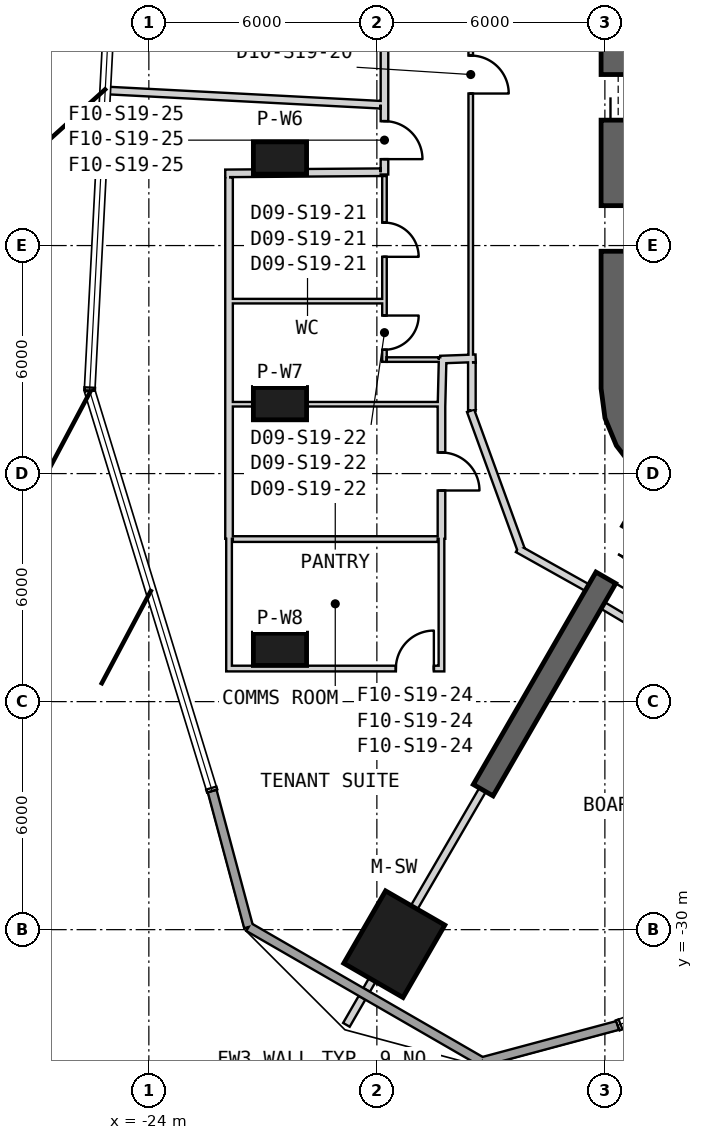
"""IFC4 building model, lengths in metres.
Left out: names, types, materials, properties, quantities, classifications, styles, units other than length and angle.
Written with IfcOpenShell. Run it as: python <this file> out.ifc"""

import sys

from ifc_helpers import new_model, si_unit, direction, frame, frame_2d, origin, origin_2d, place, context, subcontext, project, spatial, polyline, rectangle, outline, extrude, element, fill, save


model = new_model("IFC4")
c1 = context("Model", 3, precision=1e-05, world=origin(), true_north=direction((0.0, 1.0)))
c2 = subcontext(c1, "Body", "Model", "MODEL_VIEW")
j1 = project(units=[si_unit("LENGTHUNIT", "METRE"), si_unit("PLANEANGLEUNIT", "RADIAN")], contexts=[c1])
p1 = place(None, origin())
s1 = spatial("IfcSite", under=j1, at=p1, CompositionType="ELEMENT")
p2 = place(p1, origin())
s2 = spatial("IfcBuilding", under=s1, at=p2, CompositionType="ELEMENT")
p3 = place(p2, frame((0.0, 0.0, 310.4)))
s3 = spatial("IfcBuildingStorey", under=s2, at=p3, CompositionType="ELEMENT", Elevation=310.4)
p4 = place(p3, frame((-17.542, -30.383, 0.0), z_axis=(0.0, 0.0, 1.0), x_axis=(-0.5, -0.866025403784, 0.0)))
e1 = element("IfcColumn", 1, at=p4, inside=s3, PredefinedType="COLUMN", context=c2, shape_type="SweptSolid", body=[
    extrude(rectangle(XDim=2.2, YDim=1.8, at=origin_2d()), origin(), (0.0, 0.0, 1.0), 3.9),
])
for number, where, z_axis, x_axis in (
    (2, (-20.55, -9.696, 0.0), (0.0, 0.0, 1.0), (-1.0, 0.0, 0.0)),
    (3, (-20.55, -16.16, 0.0), (0.0, 0.0, 1.0), (-1.0, 0.0, 0.0)),
    (4, (-20.55, -22.624, 0.0), (0.0, 0.0, 1.0), (-1.0, 0.0, 0.0)),
):
    element("IfcColumn", number, at=place(p3, frame(where, z_axis=z_axis, x_axis=x_axis)), inside=s3, PredefinedType="COLUMN", context=c2, shape_type="SweptSolid", body=[
        extrude(rectangle(XDim=1.4, YDim=0.85, at=origin_2d()), origin(), (0.0, 0.0, 1.0), 3.9),
    ])
p5 = place(p3, frame((-11.65, 15.762, 0.0), z_axis=(0.0, 0.0, 1.0), x_axis=(0.0, -1.0, 0.0)))
e5 = element("IfcWall", 5, at=p5, inside=s3, PredefinedType="SHEAR", context=c2, shape_type="SweptSolid", body=[
    extrude(rectangle(XDim=31.523, YDim=0.9, at=frame_2d((15.762, 0.0))), origin(), (0.0, 0.0, 1.0), 3.9),
])
p6 = place(p5, frame((7.062, 0.0, 0.0)))
e6 = element("IfcOpeningElement", 6, at=p6, cuts=e5, PredefinedType="OPENING", context=c2, shape_type="SweptSolid", body=[
    extrude(rectangle(XDim=1.2, YDim=2.4, at=frame_2d((0.6, 1.2))), frame((0.0, 0.46, 0.0), z_axis=(0.0, -1.0, 0.0), x_axis=(1.0, 0.0, 0.0)), (0.0, 0.0, 1.0), 0.92),
])
p7 = place(p5, frame((9.762, 0.0, 0.0)))
e7 = element("IfcOpeningElement", 7, at=p7, cuts=e5, PredefinedType="OPENING", context=c2, shape_type="SweptSolid", body=[
    extrude(rectangle(XDim=1.2, YDim=2.4, at=frame_2d((0.6, 1.2))), frame((0.0, 0.46, 0.0), z_axis=(0.0, -1.0, 0.0), x_axis=(1.0, 0.0, 0.0)), (0.0, 0.0, 1.0), 0.92),
])
p8 = place(p5, frame((12.462, 0.0, 0.0)))
e8 = element("IfcOpeningElement", 8, at=p8, cuts=e5, PredefinedType="OPENING", context=c2, shape_type="SweptSolid", body=[
    extrude(rectangle(XDim=1.2, YDim=2.4, at=frame_2d((0.6, 1.2))), frame((0.0, 0.46, 0.0), z_axis=(0.0, -1.0, 0.0), x_axis=(1.0, 0.0, 0.0)), (0.0, 0.0, 1.0), 0.92),
])
p9 = place(p5, frame((15.162, 0.0, 0.0)))
e9 = element("IfcOpeningElement", 9, at=p9, cuts=e5, PredefinedType="OPENING", context=c2, shape_type="SweptSolid", body=[
    extrude(rectangle(XDim=1.2, YDim=2.4, at=frame_2d((0.6, 1.2))), frame((0.0, 0.46, 0.0), z_axis=(0.0, -1.0, 0.0), x_axis=(1.0, 0.0, 0.0)), (0.0, 0.0, 1.0), 0.92),
])
p10 = place(p5, frame((17.862, 0.0, 0.0)))
e10 = element("IfcOpeningElement", 10, at=p10, cuts=e5, PredefinedType="OPENING", context=c2, shape_type="SweptSolid", body=[
    extrude(rectangle(XDim=1.2, YDim=2.4, at=frame_2d((0.6, 1.2))), frame((0.0, 0.46, 0.0), z_axis=(0.0, -1.0, 0.0), x_axis=(1.0, 0.0, 0.0)), (0.0, 0.0, 1.0), 0.92),
])
p11 = place(p5, frame((20.562, 0.0, 0.0)))
e11 = element("IfcOpeningElement", 11, at=p11, cuts=e5, PredefinedType="OPENING", context=c2, shape_type="SweptSolid", body=[
    extrude(rectangle(XDim=1.2, YDim=2.4, at=frame_2d((0.6, 1.2))), frame((0.0, 0.46, 0.0), z_axis=(0.0, -1.0, 0.0), x_axis=(1.0, 0.0, 0.0)), (0.0, 0.0, 1.0), 0.92),
])
p12 = place(p5, frame((23.262, 0.0, 0.0)))
e12 = element("IfcOpeningElement", 12, at=p12, cuts=e5, PredefinedType="OPENING", context=c2, shape_type="SweptSolid", body=[
    extrude(rectangle(XDim=1.2, YDim=2.4, at=frame_2d((0.6, 1.2))), frame((0.0, 0.46, 0.0), z_axis=(0.0, -1.0, 0.0), x_axis=(1.0, 0.0, 0.0)), (0.0, 0.0, 1.0), 0.92),
])
p13 = place(p5, frame((3.612, 0.0, 0.0)))
e13 = element("IfcOpeningElement", 13, at=p13, cuts=e5, PredefinedType="OPENING", context=c2, shape_type="SweptSolid", body=[
    extrude(rectangle(XDim=1.2, YDim=2.4, at=frame_2d((0.6, 1.2))), frame((0.0, 0.46, 0.0), z_axis=(0.0, -1.0, 0.0), x_axis=(1.0, 0.0, 0.0)), (0.0, 0.0, 1.0), 0.92),
])
p14 = place(p5, frame((26.712, 0.0, 0.0)))
e14 = element("IfcOpeningElement", 14, at=p14, cuts=e5, PredefinedType="OPENING", context=c2, shape_type="SweptSolid", body=[
    extrude(rectangle(XDim=1.2, YDim=2.4, at=frame_2d((0.6, 1.2))), frame((0.0, 0.46, 0.0), z_axis=(0.0, -1.0, 0.0), x_axis=(1.0, 0.0, 0.0)), (0.0, 0.0, 1.0), 0.92),
])
p15 = place(p3, origin())
e15 = element("IfcWall", 15, at=p15, inside=s3, PredefinedType="SHEAR", context=c2, shape_type="SweptSolid", body=[
    extrude(outline(polyline([(-12.1, -15.762), (-11.998, -16.538), (-11.698, -17.262), (-11.221, -17.883), (-10.6, -18.36), (-9.876, -18.659), (-9.1, -18.762), (-8.323, -18.659), (-7.6, -18.36), (-8.05, -17.58), (-8.556, -17.79), (-9.1, -17.862), (-9.644, -17.79), (-10.15, -17.58), (-10.585, -17.247), (-10.919, -16.812), (-11.128, -16.305), (-11.2, -15.762), (-12.1, -15.762)])), origin(), (0.0, 0.0, 1.0), 3.9),
])
p16 = place(p3, frame((-10.575, -18.316, 0.0), z_axis=(0.0, 0.0, 1.0), x_axis=(-0.500009446655, -0.866019949687, 0.0)))
e16 = element("IfcWall", 16, at=p16, inside=s3, PredefinedType="SHEAR", context=c2, shape_type="SweptSolid", body=[
    extrude(rectangle(XDim=9.254, YDim=0.6, at=frame_2d((4.627, 0.0))), origin(), (0.0, 0.0, 1.0), 3.9),
])
p17 = place(p16, frame((1.4, 0.0, 0.0)))
e17 = element("IfcOpeningElement", 17, at=p17, cuts=e16, PredefinedType="OPENING", context=c2, shape_type="SweptSolid", body=[
    extrude(rectangle(XDim=1.4, YDim=2.4, at=frame_2d((0.7, 1.2))), frame((0.0, 0.31, 0.0), z_axis=(0.0, -1.0, 0.0), x_axis=(1.0, 0.0, 0.0)), (0.0, 0.0, 1.0), 0.62),
])
p18 = place(p3, frame((-22.334, -26.352, 0.0), z_axis=(0.0, 0.0, 1.0), x_axis=(0.258810736071, -0.965928052649, 0.0)))
e18 = element("IfcWall", 18, at=p18, inside=s3, PredefinedType="SOLIDWALL", context=c2, shape_type="SweptSolid", body=[
    extrude(rectangle(XDim=3.705, YDim=0.24, at=frame_2d((1.853, 0.0))), origin(), (0.0, 0.0, 1.0), 3.6),
])
p19 = place(p3, frame((-21.375, -29.931, 0.0), z_axis=(0.0, 0.0, 1.0), x_axis=(0.866031377081, -0.499989653803, 0.0)))
e19 = element("IfcWall", 19, at=p19, inside=s3, PredefinedType="SOLIDWALL", context=c2, shape_type="SweptSolid", body=[
    extrude(rectangle(XDim=7.092, YDim=0.24, at=frame_2d((3.546, 0.0))), origin(), (0.0, 0.0, 1.0), 3.6),
])
p20 = place(p3, frame((-15.233, -33.477, 0.0), z_axis=(0.0, 0.0, 1.0), x_axis=(0.965938323568, 0.258772400119, 0.0)))
e20 = element("IfcWall", 20, at=p20, inside=s3, PredefinedType="SOLIDWALL", context=c2, shape_type="SweptSolid", body=[
    extrude(rectangle(XDim=3.697, YDim=0.24, at=frame_2d((1.848, 0.0))), origin(), (0.0, 0.0, 1.0), 3.6),
])
p21 = place(p3, frame((-15.53, 0.0, 0.0), z_axis=(0.0, 0.0, 1.0), x_axis=(0.0, -1.0, 0.0)))
e21 = element("IfcWall", 21, at=p21, inside=s3, PredefinedType="PARTITIONING", context=c2, shape_type="SweptSolid", body=[
    extrude(rectangle(XDim=15.0, YDim=0.12, at=frame_2d((7.5, 0.0))), origin(), (0.0, 0.0, 1.0), 2.88),
])
p22 = place(p21, frame((7.0, 0.0, 0.0)))
e22 = element("IfcOpeningElement", 22, at=p22, cuts=e21, PredefinedType="OPENING", context=c2, shape_type="SweptSolid", body=[
    extrude(rectangle(XDim=1.0, YDim=2.1, at=frame_2d((0.5, 1.05))), frame((0.0, 0.07, 0.0), z_axis=(0.0, -1.0, 0.0), x_axis=(1.0, 0.0, 0.0)), (0.0, 0.0, 1.0), 0.14),
])
p23 = place(p3, frame((-17.8, 0.1, 0.0), z_axis=(0.0, 0.0, 1.0), x_axis=(0.0, -1.0, 0.0)))
e23 = element("IfcWall", 23, at=p23, inside=s3, PredefinedType="PARTITIONING", context=c2, shape_type="SweptSolid", body=[
    extrude(rectangle(XDim=8.423, YDim=0.2, at=frame_2d((4.211, 0.0))), origin(), (0.0, 0.0, 1.0), 2.97),
])
p24 = place(p23, frame((3.75, 0.0, 0.0)))
e24 = element("IfcOpeningElement", 24, at=p24, cuts=e23, PredefinedType="OPENING", context=c2, shape_type="SweptSolid", body=[
    extrude(rectangle(XDim=1.0, YDim=2.1, at=frame_2d((0.5, 1.05))), frame((0.0, 0.11, 0.0), z_axis=(0.0, -1.0, 0.0), x_axis=(1.0, 0.0, 0.0)), (0.0, 0.0, 1.0), 0.22),
])
p25 = place(p3, frame((-17.8, -8.323, 0.0), z_axis=(0.0, 0.0, 1.0), x_axis=(0.0, -1.0, 0.0)))
e25 = element("IfcWall", 25, at=p25, inside=s3, PredefinedType="PARTITIONING", context=c2, shape_type="SweptSolid", body=[
    extrude(rectangle(XDim=1.807, YDim=0.2, at=frame_2d((0.904, 0.0))), origin(), (0.0, 0.0, 1.0), 2.97),
])
p26 = place(p25, frame((0.404, 0.0, 0.0)))
e26 = element("IfcOpeningElement", 26, at=p26, cuts=e25, PredefinedType="OPENING", context=c2, shape_type="SweptSolid", body=[
    extrude(rectangle(XDim=1.0, YDim=2.1, at=frame_2d((0.5, 1.05))), frame((0.0, 0.11, 0.0), z_axis=(0.0, -1.0, 0.0), x_axis=(1.0, 0.0, 0.0)), (0.0, 0.0, 1.0), 0.22),
])
p27 = place(p3, frame((-16.33, -15.0, 0.0), z_axis=(0.0, 0.0, 1.0), x_axis=(0.999344339616, 0.036206227059, 0.0)))
e27 = element("IfcWall", 27, at=p27, inside=s3, PredefinedType="PARTITIONING", context=c2, shape_type="SweptSolid", body=[
    extrude(rectangle(XDim=0.93, YDim=0.2, at=frame_2d((0.465, 0.0))), origin(), (0.0, 0.0, 1.0), 3.6),
])
p28 = place(p3, frame((-17.8, -10.17, 0.0), z_axis=(0.0, 0.0, 1.0), x_axis=(0.0, -1.0, 0.0)))
e28 = element("IfcWall", 28, at=p28, inside=s3, PredefinedType="PARTITIONING", context=c2, shape_type="SweptSolid", body=[
    extrude(rectangle(XDim=4.89, YDim=0.12, at=frame_2d((2.445, 0.0))), origin(), (0.0, 0.0, 1.0), 2.88),
])
p29 = place(p28, frame((1.226, 0.0, 0.0)))
e29 = element("IfcOpeningElement", 29, at=p29, cuts=e28, PredefinedType="OPENING", context=c2, shape_type="SweptSolid", body=[
    extrude(rectangle(XDim=0.9, YDim=2.1, at=frame_2d((0.45, 1.05))), frame((0.0, 0.07, 0.0), z_axis=(0.0, -1.0, 0.0), x_axis=(1.0, 0.0, 0.0)), (0.0, 0.0, 1.0), 0.14),
])
p30 = place(p28, frame((3.671, 0.0, 0.0)))
e30 = element("IfcOpeningElement", 30, at=p30, cuts=e28, PredefinedType="OPENING", context=c2, shape_type="SweptSolid", body=[
    extrude(rectangle(XDim=0.9, YDim=2.1, at=frame_2d((0.45, 1.05))), frame((0.0, 0.07, 0.0), z_axis=(0.0, -1.0, 0.0), x_axis=(1.0, 0.0, 0.0)), (0.0, 0.0, 1.0), 0.14),
])
p31 = place(p3, frame((-17.74, -15.0, 0.0), z_axis=(0.0, 0.0, 1.0), x_axis=(1.0, 0.0, 0.0)))
e31 = element("IfcWall", 31, at=p31, inside=s3, PredefinedType="PARTITIONING", context=c2, shape_type="SweptSolid", body=[
    extrude(rectangle(XDim=1.37, YDim=0.12, at=frame_2d((0.685, 0.0))), origin(), (0.0, 0.0, 1.0), 3.6),
])
p32 = place(p3, frame((-14.293, -19.978, 0.0), z_axis=(0.0, 0.0, 1.0), x_axis=(0.872510000486, -0.48859625362, 0.0)))
e32 = element("IfcWall", 32, at=p32, inside=s3, PredefinedType="PARTITIONING", context=c2, shape_type="SweptSolid", body=[
    extrude(rectangle(XDim=2.09, YDim=0.2, at=frame_2d((1.045, 0.0))), origin(), (0.0, 0.0, 1.0), 3.6),
])
p33 = place(p3, frame((-15.534, -16.346, 0.0), z_axis=(0.0, 0.0, 1.0), x_axis=(0.342001008711, -0.939699584996, 0.0)))
e33 = element("IfcWall", 33, at=p33, inside=s3, PredefinedType="PARTITIONING", context=c2, shape_type="SweptSolid", body=[
    extrude(rectangle(XDim=3.875, YDim=0.2, at=frame_2d((1.938, 0.0))), origin(), (0.0, 0.0, 1.0), 2.88),
])
p34 = place(p3, frame((-15.5, -15.07, 0.0), z_axis=(0.0, 0.0, 1.0), x_axis=(0.0, -1.0, 0.0)))
e34 = element("IfcWall", 34, at=p34, inside=s3, PredefinedType="PARTITIONING", context=c2, shape_type="SweptSolid", body=[
    extrude(rectangle(XDim=1.271, YDim=0.2, at=frame_2d((0.635, 0.0))), origin(), (0.0, 0.0, 1.0), 3.6),
])
p35 = place(p3, frame((-12.05, -21.472, 0.0), z_axis=(0.0, 0.0, 1.0), x_axis=(0.859577966481, -0.511004617924, 0.0)))
e35 = element("IfcWall", 35, at=p35, inside=s3, PredefinedType="PARTITIONING", context=c2, shape_type="SweptSolid", body=[
    extrude(rectangle(XDim=1.998, YDim=0.2, at=frame_2d((0.999, 0.0))), origin(), (0.0, 0.0, 1.0), 3.6),
])
p36 = place(p3, frame((-25.148, -7.917, 0.0), z_axis=(0.0, 0.0, 1.0), x_axis=(0.998646853221, -0.052004447423, 0.0)))
e36 = element("IfcWall", 36, at=p36, inside=s3, PredefinedType="PARTITIONING", context=c2, shape_type="SweptSolid", body=[
    extrude(rectangle(XDim=7.258, YDim=0.2, at=frame_2d((3.629, 0.0))), origin(), (0.0, 0.0, 1.0), 2.97),
])
p37 = place(p3, frame((-18.117, -31.32, 0.0), z_axis=(0.0, 0.0, 1.0), x_axis=(-0.500091252813, -0.865972712538, 0.0)))
e37 = element("IfcWall", 37, at=p37, inside=s3, PredefinedType="PARTITIONING", context=c2, shape_type="SweptSolid", body=[
    extrude(rectangle(XDim=0.306, YDim=0.2, at=frame_2d((0.153, 0.0))), origin(), (0.0, 0.0, 1.0), 3.6),
])
p38 = place(p3, frame((-18.39, -31.793, 0.0), z_axis=(0.0, 0.0, 1.0), x_axis=(-0.499970888758, -0.866042210515, 0.0)))
e38 = element("IfcWall", 38, at=p38, inside=s3, PredefinedType="PARTITIONING", context=c2, shape_type="SweptSolid", body=[
    extrude(rectangle(XDim=0.822, YDim=0.2, at=frame_2d((0.411, 0.0))), origin(), (0.0, 0.0, 1.0), 3.6),
])
p39 = place(p3, frame((-15.218, -26.321, 0.0), z_axis=(0.0, 0.0, 1.0), x_axis=(-0.50277219784, -0.864418947663, 0.0)))
e39 = element("IfcWall", 39, at=p39, inside=s3, PredefinedType="PARTITIONING", context=c2, shape_type="SweptSolid", body=[
    extrude(rectangle(XDim=3.579, YDim=0.2, at=frame_2d((1.79, 0.0))), origin(), (0.0, 0.0, 1.0), 3.17),
])
p40 = place(p3, frame((-17.9, -10.071, 0.0), z_axis=(0.0, 0.0, 1.0), x_axis=(-0.999973048838, -0.007341770728, 0.0)))
e40 = element("IfcWall", 40, at=p40, inside=s3, PredefinedType="PARTITIONING", context=c2, shape_type="SweptSolid", body=[
    extrude(rectangle(XDim=4.09, YDim=0.2, at=frame_2d((2.045, 0.0))), origin(), (0.0, 0.0, 1.0), 3.6),
])
p41 = place(p3, frame((-21.89, -10.2, 0.0), z_axis=(0.0, 0.0, 1.0), x_axis=(0.0, -1.0, 0.0)))
e41 = element("IfcWall", 41, at=p41, inside=s3, PredefinedType="PARTITIONING", context=c2, shape_type="SweptSolid", body=[
    extrude(rectangle(XDim=5.975, YDim=0.2, at=frame_2d((2.988, 0.0))), origin(), (0.0, 0.0, 1.0), 3.6),
])
p42 = place(p3, frame((-21.89, -16.175, 0.0), z_axis=(0.0, 0.0, 1.0), x_axis=(0.0, -1.0, 0.0)))
e42 = element("IfcWall", 42, at=p42, inside=s3, PredefinedType="PARTITIONING", context=c2, shape_type="SweptSolid", body=[
    extrude(rectangle(XDim=3.54, YDim=0.2, at=frame_2d((1.77, 0.0))), origin(), (0.0, 0.0, 1.0), 3.6),
])
p43 = place(p3, frame((-16.269, -14.94, 0.0), z_axis=(0.0, 0.0, 1.0), x_axis=(-0.024314076851, -0.999704369135, 0.0)))
e43 = element("IfcWall", 43, at=p43, inside=s3, PredefinedType="PARTITIONING", context=c2, shape_type="SweptSolid", body=[
    extrude(rectangle(XDim=1.295, YDim=0.2, at=frame_2d((0.648, 0.0))), origin(), (0.0, 0.0, 1.0), 3.6),
])
p44 = place(p3, frame((-16.3, -16.115, 0.0), z_axis=(0.0, 0.0, 1.0), x_axis=(0.0, -1.0, 0.0)))
e44 = element("IfcWall", 44, at=p44, inside=s3, PredefinedType="PARTITIONING", context=c2, shape_type="SweptSolid", body=[
    extrude(rectangle(XDim=3.6, YDim=0.2, at=frame_2d((1.8, 0.0))), origin(), (0.0, 0.0, 1.0), 2.88),
])
p45 = place(p44, frame((1.33, 0.0, 0.0)))
e45 = element("IfcOpeningElement", 45, at=p45, cuts=e44, PredefinedType="OPENING", context=c2, shape_type="SweptSolid", body=[
    extrude(rectangle(XDim=1.0, YDim=2.1, at=frame_2d((0.5, 1.05))), frame((0.0, 0.11, 0.0), z_axis=(0.0, -1.0, 0.0), x_axis=(1.0, 0.0, 0.0)), (0.0, 0.0, 1.0), 0.22),
])
p46 = place(p3, frame((-21.89, -19.715, 0.0), z_axis=(0.0, 0.0, 1.0), x_axis=(0.0, -1.0, 0.0)))
e46 = element("IfcWall", 46, at=p46, inside=s3, PredefinedType="PLUMBINGWALL", context=c2, shape_type="SweptSolid", body=[
    extrude(rectangle(XDim=3.49, YDim=0.15, at=frame_2d((1.745, 0.0))), origin(), (0.0, 0.0, 1.0), 3.6),
])
p47 = place(p3, frame((-21.815, -23.13, 0.0), z_axis=(0.0, 0.0, 1.0), x_axis=(1.0, 0.0, 0.0)))
e47 = element("IfcWall", 47, at=p47, inside=s3, PredefinedType="PLUMBINGWALL", context=c2, shape_type="SweptSolid", body=[
    extrude(rectangle(XDim=5.59, YDim=0.15, at=frame_2d((2.795, 0.0))), origin(), (0.0, 0.0, 1.0), 3.6),
])
p48 = place(p47, frame((4.315, 0.0, 0.0)))
e48 = element("IfcOpeningElement", 48, at=p48, cuts=e47, PredefinedType="OPENING", context=c2, shape_type="SweptSolid", body=[
    extrude(rectangle(XDim=1.0, YDim=2.1, at=frame_2d((0.5, 1.05))), frame((0.0, 0.085, 0.0), z_axis=(0.0, -1.0, 0.0), x_axis=(1.0, 0.0, 0.0)), (0.0, 0.0, 1.0), 0.17),
])
p49 = place(p3, frame((-16.3, -19.715, 0.0), z_axis=(0.0, 0.0, 1.0), x_axis=(0.0, -1.0, 0.0)))
e49 = element("IfcWall", 49, at=p49, inside=s3, PredefinedType="PLUMBINGWALL", context=c2, shape_type="SweptSolid", body=[
    extrude(rectangle(XDim=3.34, YDim=0.15, at=frame_2d((1.67, 0.0))), origin(), (0.0, 0.0, 1.0), 3.6),
])
p50 = place(p3, frame((-21.79, -13.463, 0.0), z_axis=(0.0, 0.0, 1.0), x_axis=(1.0, 0.0, 0.0)))
e50 = element("IfcWall", 50, at=p50, inside=s3, PredefinedType="PARTITIONING", context=c2, shape_type="SweptSolid", body=[
    extrude(rectangle(XDim=3.93, YDim=0.12, at=frame_2d((1.965, 0.0))), origin(), (0.0, 0.0, 1.0), 3.6),
])
p51 = place(p3, frame((-16.4, -16.175, 0.0), z_axis=(0.0, 0.0, 1.0), x_axis=(-1.0, 0.0, 0.0)))
e51 = element("IfcWall", 51, at=p51, inside=s3, PredefinedType="PARTITIONING", context=c2, shape_type="SweptSolid", body=[
    extrude(rectangle(XDim=5.39, YDim=0.12, at=frame_2d((2.695, 0.0))), origin(), (0.0, 0.0, 1.0), 3.6),
])
p52 = place(p3, frame((-21.79, -19.723, 0.0), z_axis=(0.0, 0.0, 1.0), x_axis=(1.0, 0.0, 0.0)))
e52 = element("IfcWall", 52, at=p52, inside=s3, PredefinedType="PLUMBINGWALL", context=c2, shape_type="SweptSolid", body=[
    extrude(rectangle(XDim=5.39, YDim=0.15, at=frame_2d((2.695, 0.0))), origin(), (0.0, 0.0, 1.0), 2.88),
])
p53 = place(p22, origin())
e53 = element("IfcDoor", 53, at=p53, inside=s3, OperationType="SINGLE_SWING_LEFT", PredefinedType="NOTDEFINED", context=c2, shape_type="SweptSolid", body=[
    extrude(rectangle(XDim=1.0, YDim=2.1, at=frame_2d((0.5, 1.05))), frame((0.0, 0.025, 0.0), z_axis=(0.0, -1.0, 0.0), x_axis=(1.0, 0.0, 0.0)), (0.0, 0.0, 1.0), 0.05),
])
fill(e22, e53)
p54 = place(p29, origin())
e54 = element("IfcDoor", 54, at=p54, inside=s3, OperationType="SINGLE_SWING_RIGHT", PredefinedType="NOTDEFINED", context=c2, shape_type="SweptSolid", body=[
    extrude(rectangle(XDim=0.9, YDim=2.1, at=frame_2d((0.45, 1.05))), frame((0.0, 0.025, 0.0), z_axis=(0.0, -1.0, 0.0), x_axis=(1.0, 0.0, 0.0)), (0.0, 0.0, 1.0), 0.05),
])
fill(e29, e54)
p55 = place(p30, origin())
e55 = element("IfcDoor", 55, at=p55, inside=s3, OperationType="SINGLE_SWING_RIGHT", PredefinedType="NOTDEFINED", context=c2, shape_type="SweptSolid", body=[
    extrude(rectangle(XDim=0.9, YDim=2.1, at=frame_2d((0.45, 1.05))), frame((0.0, 0.025, 0.0), z_axis=(0.0, -1.0, 0.0), x_axis=(1.0, 0.0, 0.0)), (0.0, 0.0, 1.0), 0.05),
])
fill(e30, e55)
p56 = place(p45, origin())
e56 = element("IfcDoor", 56, at=p56, inside=s3, OperationType="SINGLE_SWING_LEFT", PredefinedType="USERDEFINED", context=c2, shape_type="SweptSolid", body=[
    extrude(rectangle(XDim=1.0, YDim=2.1, at=frame_2d((0.5, 1.05))), frame((0.0, 0.025, 0.0), z_axis=(0.0, -1.0, 0.0), x_axis=(1.0, 0.0, 0.0)), (0.0, 0.0, 1.0), 0.05),
])
fill(e45, e56)
p57 = place(p48, origin())
e57 = element("IfcDoor", 57, at=p57, inside=s3, OperationType="SINGLE_SWING_LEFT", PredefinedType="USERDEFINED", context=c2, shape_type="SweptSolid", body=[
    extrude(rectangle(XDim=1.0, YDim=2.1, at=frame_2d((0.5, 1.05))), frame((0.0, 0.025, 0.0), z_axis=(0.0, -1.0, 0.0), x_axis=(1.0, 0.0, 0.0)), (0.0, 0.0, 1.0), 0.05),
])
fill(e48, e57)
p58 = place(p26, origin())
e58 = element("IfcDoor", 58, at=p58, inside=s3, OperationType="SINGLE_SWING_RIGHT", PredefinedType="USERDEFINED", context=c2, shape_type="SweptSolid", body=[
    extrude(rectangle(XDim=1.0, YDim=2.1, at=frame_2d((0.5, 1.05))), frame((0.0, 0.025, 0.0), z_axis=(0.0, -1.0, 0.0), x_axis=(1.0, 0.0, 0.0)), (0.0, 0.0, 1.0), 0.05),
])
fill(e26, e58)
p59 = place(p12, origin())
e59 = element("IfcDoor", 59, at=p59, inside=s3, OperationType="SLIDING_TO_LEFT", PredefinedType="USERDEFINED", context=c2, shape_type="SweptSolid", body=[
    extrude(rectangle(XDim=1.2, YDim=2.4, at=frame_2d((0.6, 1.2))), frame((0.0, 0.025, 0.0), z_axis=(0.0, -1.0, 0.0), x_axis=(1.0, 0.0, 0.0)), (0.0, 0.0, 1.0), 0.05),
])
fill(e12, e59)
p60 = place(p14, origin())
e60 = element("IfcDoor", 60, at=p60, inside=s3, OperationType="SINGLE_SWING_RIGHT", PredefinedType="USERDEFINED", context=c2, shape_type="SweptSolid", body=[
    extrude(rectangle(XDim=1.2, YDim=2.4, at=frame_2d((0.6, 1.2))), frame((0.0, 0.025, 0.0), z_axis=(0.0, -1.0, 0.0), x_axis=(1.0, 0.0, 0.0)), (0.0, 0.0, 1.0), 0.05),
])
fill(e14, e60)
p61 = place(p17, origin())
e61 = element("IfcDoor", 61, at=p61, inside=s3, OperationType="DOUBLE_DOOR_SINGLE_SWING", PredefinedType="NOTDEFINED", context=c2, shape_type="SweptSolid", body=[
    extrude(rectangle(XDim=1.4, YDim=2.4, at=frame_2d((0.7, 1.2))), frame((0.0, 0.025, 0.0), z_axis=(0.0, -1.0, 0.0), x_axis=(1.0, 0.0, 0.0)), (0.0, 0.0, 1.0), 0.05),
])
fill(e17, e61)
save(model, sys.argv[1])
